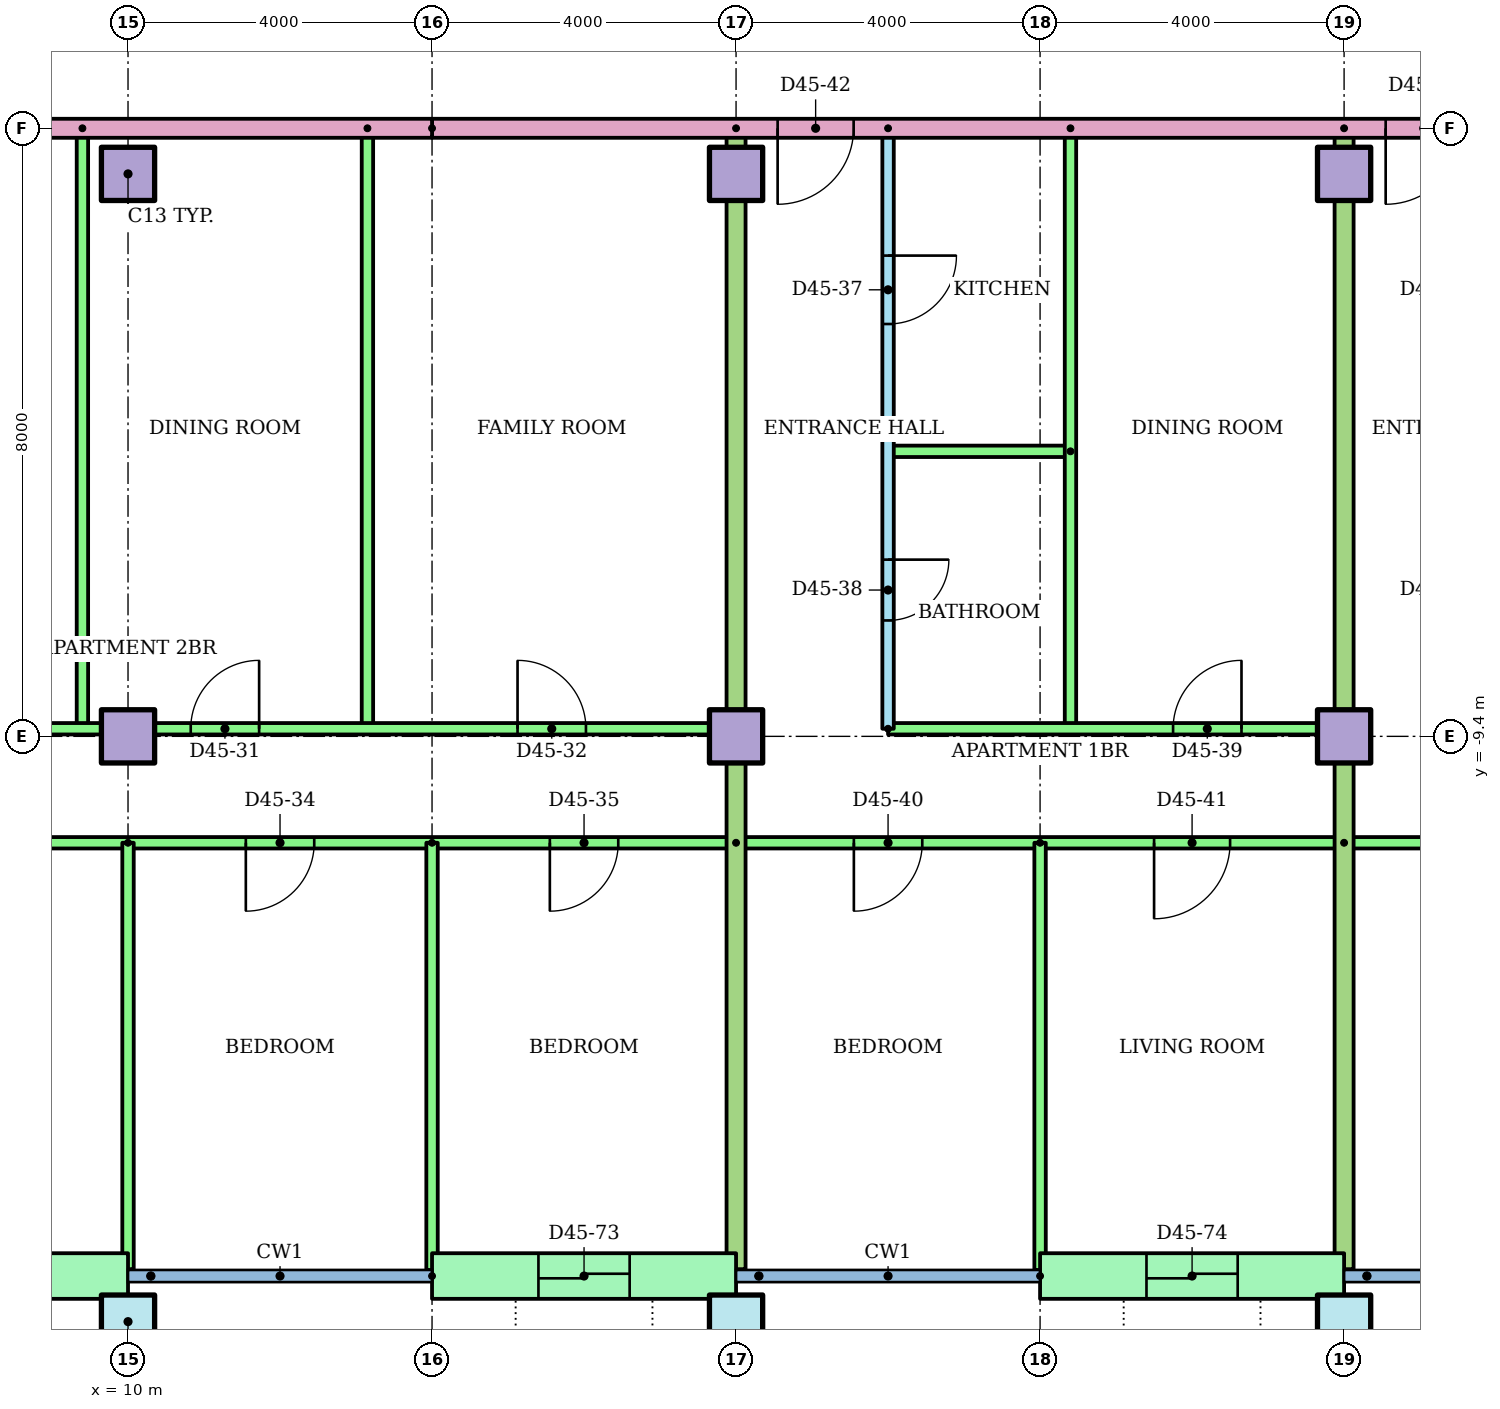
"""IFC4 building model, lengths in metres.
Left out: names, types, materials, properties, quantities, classifications, styles, units other than length and angle.
Written with IfcOpenShell. Run it as: python <this file> out.ifc"""

import sys

from ifc_helpers import new_model, si_unit, direction, frame, frame_2d, origin, origin_2d, place, context, subcontext, project, spatial, rectangle, hollow_rectangle, extrude, element, fill, save


model = new_model("IFC4")
c1 = context("Model", 3, precision=1e-05, world=origin(), true_north=direction((0.0, 1.0)))
c2 = subcontext(c1, "Body", "Model", "MODEL_VIEW")
j1 = project(units=[si_unit("LENGTHUNIT", "METRE"), si_unit("PLANEANGLEUNIT", "RADIAN")], contexts=[c1])
p1 = place(None, origin())
s1 = spatial("IfcSite", under=j1, at=p1, CompositionType="ELEMENT")
p2 = place(p1, origin())
s2 = spatial("IfcBuilding", under=s1, at=p2, CompositionType="ELEMENT")
p3 = place(p2, frame((0.0, 0.0, 174.9)))
s3 = spatial("IfcBuildingStorey", under=s2, at=p3, CompositionType="ELEMENT", Elevation=174.9)
for number, where in (
    (1, (10.0, -17.1, 0.0)),
    (2, (18.0, -17.1, 0.0)),
    (3, (26.0, -17.1, 0.0)),
):
    element("IfcColumn", number, at=place(p3, frame(where)), inside=s3, PredefinedType="COLUMN", context=c2, shape_type="SweptSolid", body=[
        extrude(hollow_rectangle(XDim=0.7, YDim=0.7, WallThickness=0.036, at=origin_2d()), origin(), (0.0, 0.0, 1.0), 3.2),
    ])
for number, where in (
    (4, (10.0, -9.4, 0.0)),
    (5, (18.0, -9.4, 0.0)),
    (6, (26.0, -9.4, 0.0)),
    (7, (10.0, -2.0, 0.0)),
    (8, (18.0, -2.0, 0.0)),
    (9, (26.0, -2.0, 0.0)),
):
    element("IfcColumn", number, at=place(p3, frame(where)), inside=s3, PredefinedType="COLUMN", context=c2, shape_type="SweptSolid", body=[
        extrude(rectangle(XDim=0.7, YDim=0.7, at=origin_2d()), origin(), (0.0, 0.0, 1.0), 3.2),
    ])
p4 = place(p3, frame((6.0, -16.5, 0.0)))
e10 = element("IfcWall", 10, at=p4, inside=s3, PredefinedType="STANDARD", context=c2, shape_type="SweptSolid", body=[
    extrude(rectangle(XDim=4.0, YDim=0.6, at=frame_2d((2.0, 0.0))), origin(), (0.0, 0.0, 1.0), 2.92),
])
p5 = place(p4, frame((1.4, 0.0, 0.0)))
e11 = element("IfcOpeningElement", 11, at=p5, cuts=e10, PredefinedType="OPENING", context=c2, shape_type="SweptSolid", body=[
    extrude(rectangle(XDim=1.2, YDim=2.1, at=frame_2d((0.6, 1.05))), frame((0.0, 0.31, 0.0), z_axis=(0.0, -1.0, 0.0), x_axis=(1.0, 0.0, 0.0)), (0.0, 0.0, 1.0), 0.62),
])
p6 = place(p3, frame((14.0, -16.5, 0.0)))
e12 = element("IfcWall", 12, at=p6, inside=s3, PredefinedType="STANDARD", context=c2, shape_type="SweptSolid", body=[
    extrude(rectangle(XDim=4.0, YDim=0.6, at=frame_2d((2.0, 0.0))), origin(), (0.0, 0.0, 1.0), 2.92),
])
p7 = place(p6, frame((1.4, 0.0, 0.0)))
e13 = element("IfcOpeningElement", 13, at=p7, cuts=e12, PredefinedType="OPENING", context=c2, shape_type="SweptSolid", body=[
    extrude(rectangle(XDim=1.2, YDim=2.1, at=frame_2d((0.6, 1.05))), frame((0.0, 0.31, 0.0), z_axis=(0.0, -1.0, 0.0), x_axis=(1.0, 0.0, 0.0)), (0.0, 0.0, 1.0), 0.62),
])
p8 = place(p3, frame((22.0, -16.5, 0.0)))
e14 = element("IfcWall", 14, at=p8, inside=s3, PredefinedType="STANDARD", context=c2, shape_type="SweptSolid", body=[
    extrude(rectangle(XDim=4.0, YDim=0.6, at=frame_2d((2.0, 0.0))), origin(), (0.0, 0.0, 1.0), 2.92),
])
p9 = place(p8, frame((1.4, 0.0, 0.0)))
e15 = element("IfcOpeningElement", 15, at=p9, cuts=e14, PredefinedType="OPENING", context=c2, shape_type="SweptSolid", body=[
    extrude(rectangle(XDim=1.2, YDim=2.1, at=frame_2d((0.6, 1.05))), frame((0.0, 0.31, 0.0), z_axis=(0.0, -1.0, 0.0), x_axis=(1.0, 0.0, 0.0)), (0.0, 0.0, 1.0), 0.62),
])
for number, where, z_axis, x_axis in (
    (16, (9.4, -1.4, 0.0), (0.0, 0.0, 1.0), (0.0, -1.0, 0.0)),
    (17, (13.15, -1.4, 0.0), (0.0, 0.0, 1.0), (0.0, -1.0, 0.0)),
):
    element("IfcWall", number, at=place(p3, frame(where, z_axis=z_axis, x_axis=x_axis)), inside=s3, PredefinedType="PARTITIONING", context=c2, shape_type="SweptSolid", body=[
        extrude(rectangle(XDim=7.9, YDim=0.15, at=frame_2d((3.95, 0.0))), origin(), (0.0, 0.0, 1.0), 2.4),
    ])
p10 = place(p3, frame((4.0, -9.3, 0.0)))
e18 = element("IfcWall", 18, at=p10, inside=s3, PredefinedType="PARTITIONING", context=c2, shape_type="SweptSolid", body=[
    extrude(rectangle(XDim=14.0, YDim=0.15, at=frame_2d((7.0, 0.0))), origin(), (0.0, 0.0, 1.0), 2.4),
])
p11 = place(p10, frame((3.45, 0.0, 0.0)))
e19 = element("IfcOpeningElement", 19, at=p11, cuts=e18, PredefinedType="OPENING", context=c2, shape_type="SweptSolid", body=[
    extrude(rectangle(XDim=0.9, YDim=2.1, at=frame_2d((0.45, 1.05))), frame((0.0, 0.085, 0.0), z_axis=(0.0, -1.0, 0.0), x_axis=(1.0, 0.0, 0.0)), (0.0, 0.0, 1.0), 0.17),
])
p12 = place(p10, frame((6.825, 0.0, 0.0)))
e20 = element("IfcOpeningElement", 20, at=p12, cuts=e18, PredefinedType="OPENING", context=c2, shape_type="SweptSolid", body=[
    extrude(rectangle(XDim=0.9, YDim=2.1, at=frame_2d((0.45, 1.05))), frame((0.0, 0.085, 0.0), z_axis=(0.0, -1.0, 0.0), x_axis=(1.0, 0.0, 0.0)), (0.0, 0.0, 1.0), 0.17),
])
p13 = place(p10, frame((11.125, 0.0, 0.0)))
e21 = element("IfcOpeningElement", 21, at=p13, cuts=e18, PredefinedType="OPENING", context=c2, shape_type="SweptSolid", body=[
    extrude(rectangle(XDim=0.9, YDim=2.1, at=frame_2d((0.45, 1.05))), frame((0.0, 0.085, 0.0), z_axis=(0.0, -1.0, 0.0), x_axis=(1.0, 0.0, 0.0)), (0.0, 0.0, 1.0), 0.17),
])
p14 = place(p3, frame((18.0, -10.8, 0.0), z_axis=(0.0, 0.0, 1.0), x_axis=(-1.0, 0.0, 0.0)))
e22 = element("IfcWall", 22, at=p14, inside=s3, PredefinedType="PARTITIONING", context=c2, shape_type="SweptSolid", body=[
    extrude(rectangle(XDim=16.0, YDim=0.15, at=frame_2d((8.0, 0.0))), origin(), (0.0, 0.0, 1.0), 2.4),
])
p15 = place(p14, frame((11.5, 0.0, 0.0)))
e23 = element("IfcOpeningElement", 23, at=p15, cuts=e22, PredefinedType="OPENING", context=c2, shape_type="SweptSolid", body=[
    extrude(rectangle(XDim=1.0, YDim=2.1, at=frame_2d((0.5, 1.05))), frame((0.0, 0.085, 0.0), z_axis=(0.0, -1.0, 0.0), x_axis=(1.0, 0.0, 0.0)), (0.0, 0.0, 1.0), 0.17),
])
p16 = place(p14, frame((5.55, 0.0, 0.0)))
e24 = element("IfcOpeningElement", 24, at=p16, cuts=e22, PredefinedType="OPENING", context=c2, shape_type="SweptSolid", body=[
    extrude(rectangle(XDim=0.9, YDim=2.1, at=frame_2d((0.45, 1.05))), frame((0.0, 0.085, 0.0), z_axis=(0.0, -1.0, 0.0), x_axis=(1.0, 0.0, 0.0)), (0.0, 0.0, 1.0), 0.17),
])
p17 = place(p14, frame((1.55, 0.0, 0.0)))
e25 = element("IfcOpeningElement", 25, at=p17, cuts=e22, PredefinedType="OPENING", context=c2, shape_type="SweptSolid", body=[
    extrude(rectangle(XDim=0.9, YDim=2.1, at=frame_2d((0.45, 1.05))), frame((0.0, 0.085, 0.0), z_axis=(0.0, -1.0, 0.0), x_axis=(1.0, 0.0, 0.0)), (0.0, 0.0, 1.0), 0.17),
])
p18 = place(p3, frame((10.0, -10.8, 0.0), z_axis=(0.0, 0.0, 1.0), x_axis=(0.0, -1.0, 0.0)))
e26 = element("IfcWall", 26, at=p18, inside=s3, PredefinedType="PARTITIONING", context=c2, shape_type="SweptSolid", body=[
    extrude(rectangle(XDim=5.61, YDim=0.15, at=frame_2d((2.805, 0.0))), origin(), (0.0, 0.0, 1.0), 2.4),
])
p19 = place(p3, frame((14.0, -10.8, 0.0), z_axis=(0.0, 0.0, 1.0), x_axis=(0.0, -1.0, 0.0)))
e27 = element("IfcWall", 27, at=p19, inside=s3, PredefinedType="PARTITIONING", context=c2, shape_type="SweptSolid", body=[
    extrude(rectangle(XDim=5.621, YDim=0.15, at=frame_2d((2.811, 0.0))), origin(), (0.0, 0.0, 1.0), 2.4),
])
p20 = place(p3, frame((20.0, -1.4, 0.0), z_axis=(0.0, 0.0, 1.0), x_axis=(0.0, -1.0, 0.0)))
e28 = element("IfcWall", 28, at=p20, inside=s3, PredefinedType="PARTITIONING", context=c2, shape_type="SweptSolid", body=[
    extrude(rectangle(XDim=7.9, YDim=0.15, at=frame_2d((3.95, 0.0))), origin(), (0.0, 0.0, 1.0), 2.4),
])
p21 = place(p20, frame((1.675, 0.0, 0.0)))
e29 = element("IfcOpeningElement", 29, at=p21, cuts=e28, PredefinedType="OPENING", context=c2, shape_type="SweptSolid", body=[
    extrude(rectangle(XDim=0.9, YDim=2.1, at=frame_2d((0.45, 1.05))), frame((0.0, 0.085, 0.0), z_axis=(0.0, -1.0, 0.0), x_axis=(1.0, 0.0, 0.0)), (0.0, 0.0, 1.0), 0.17),
])
p22 = place(p20, frame((5.675, 0.0, 0.0)))
e30 = element("IfcOpeningElement", 30, at=p22, cuts=e28, PredefinedType="OPENING", context=c2, shape_type="SweptSolid", body=[
    extrude(rectangle(XDim=0.8, YDim=2.1, at=frame_2d((0.4, 1.05))), frame((0.0, 0.085, 0.0), z_axis=(0.0, -1.0, 0.0), x_axis=(1.0, 0.0, 0.0)), (0.0, 0.0, 1.0), 0.17),
])
p23 = place(p3, frame((22.4, -5.65, 0.0), z_axis=(0.0, 0.0, 1.0), x_axis=(-1.0, 0.0, 0.0)))
e31 = element("IfcWall", 31, at=p23, inside=s3, PredefinedType="PARTITIONING", context=c2, shape_type="SweptSolid", body=[
    extrude(rectangle(XDim=2.4, YDim=0.15, at=frame_2d((1.2, 0.0))), origin(), (0.0, 0.0, 1.0), 2.4),
])
p24 = place(p3, frame((22.4, -1.4, 0.0), z_axis=(0.0, 0.0, 1.0), x_axis=(0.0, -1.0, 0.0)))
e32 = element("IfcWall", 32, at=p24, inside=s3, PredefinedType="PARTITIONING", context=c2, shape_type="SweptSolid", body=[
    extrude(rectangle(XDim=7.9, YDim=0.15, at=frame_2d((3.95, 0.0))), origin(), (0.0, 0.0, 1.0), 2.4),
])
p25 = place(p3, frame((20.0, -9.3, 0.0)))
e33 = element("IfcWall", 33, at=p25, inside=s3, PredefinedType="PARTITIONING", context=c2, shape_type="SweptSolid", body=[
    extrude(rectangle(XDim=6.0, YDim=0.15, at=frame_2d((3.0, 0.0))), origin(), (0.0, 0.0, 1.0), 2.4),
])
p26 = place(p25, frame((3.75, 0.0, 0.0)))
e34 = element("IfcOpeningElement", 34, at=p26, cuts=e33, PredefinedType="OPENING", context=c2, shape_type="SweptSolid", body=[
    extrude(rectangle(XDim=0.9, YDim=2.1, at=frame_2d((0.45, 1.05))), frame((0.0, 0.085, 0.0), z_axis=(0.0, -1.0, 0.0), x_axis=(1.0, 0.0, 0.0)), (0.0, 0.0, 1.0), 0.17),
])
p27 = place(p3, frame((26.0, -10.8, 0.0), z_axis=(0.0, 0.0, 1.0), x_axis=(-1.0, 0.0, 0.0)))
e35 = element("IfcWall", 35, at=p27, inside=s3, PredefinedType="PARTITIONING", context=c2, shape_type="SweptSolid", body=[
    extrude(rectangle(XDim=8.0, YDim=0.15, at=frame_2d((4.0, 0.0))), origin(), (0.0, 0.0, 1.0), 2.4),
])
p28 = place(p27, frame((5.55, 0.0, 0.0)))
e36 = element("IfcOpeningElement", 36, at=p28, cuts=e35, PredefinedType="OPENING", context=c2, shape_type="SweptSolid", body=[
    extrude(rectangle(XDim=0.9, YDim=2.1, at=frame_2d((0.45, 1.05))), frame((0.0, 0.085, 0.0), z_axis=(0.0, -1.0, 0.0), x_axis=(1.0, 0.0, 0.0)), (0.0, 0.0, 1.0), 0.17),
])
p29 = place(p27, frame((1.5, 0.0, 0.0)))
e37 = element("IfcOpeningElement", 37, at=p29, cuts=e35, PredefinedType="OPENING", context=c2, shape_type="SweptSolid", body=[
    extrude(rectangle(XDim=1.0, YDim=2.1, at=frame_2d((0.5, 1.05))), frame((0.0, 0.085, 0.0), z_axis=(0.0, -1.0, 0.0), x_axis=(1.0, 0.0, 0.0)), (0.0, 0.0, 1.0), 0.17),
])
p30 = place(p3, frame((22.0, -10.8, 0.0), z_axis=(0.0, 0.0, 1.0), x_axis=(0.0, -1.0, 0.0)))
e38 = element("IfcWall", 38, at=p30, inside=s3, PredefinedType="PARTITIONING", context=c2, shape_type="SweptSolid", body=[
    extrude(rectangle(XDim=5.621, YDim=0.15, at=frame_2d((2.811, 0.0))), origin(), (0.0, 0.0, 1.0), 2.4),
])
p31 = place(p3, frame((18.0, -1.4, 0.0), z_axis=(0.0, 0.0, 1.0), x_axis=(0.0, -1.0, 0.0)))
e39 = element("IfcWall", 39, at=p31, inside=s3, PredefinedType="PARTITIONING", context=c2, shape_type="SweptSolid", body=[
    extrude(rectangle(XDim=15.01, YDim=0.25, at=frame_2d((7.505, 0.0))), origin(), (0.0, 0.0, 1.0), 2.4),
])
p32 = place(p3, frame((36.82, -10.8, 0.0), z_axis=(0.0, 0.0, 1.0), x_axis=(-1.0, 0.0, 0.0)))
e40 = element("IfcWall", 40, at=p32, inside=s3, PredefinedType="PARTITIONING", context=c2, shape_type="SweptSolid", body=[
    extrude(rectangle(XDim=10.82, YDim=0.15, at=frame_2d((5.41, 0.0))), origin(), (0.0, 0.0, 1.0), 2.4),
])
p33 = place(p32, frame((7.27, 0.0, 0.0)))
e41 = element("IfcOpeningElement", 41, at=p33, cuts=e40, PredefinedType="OPENING", context=c2, shape_type="SweptSolid", body=[
    extrude(rectangle(XDim=1.0, YDim=2.1, at=frame_2d((0.5, 1.05))), frame((0.0, 0.085, 0.0), z_axis=(0.0, -1.0, 0.0), x_axis=(1.0, 0.0, 0.0)), (0.0, 0.0, 1.0), 0.17),
])
p34 = place(p32, frame((1.373, 0.0, 0.0)))
e42 = element("IfcOpeningElement", 42, at=p34, cuts=e40, PredefinedType="OPENING", context=c2, shape_type="SweptSolid", body=[
    extrude(rectangle(XDim=0.9, YDim=2.1, at=frame_2d((0.45, 1.05))), frame((0.0, 0.085, 0.0), z_axis=(0.0, -1.0, 0.0), x_axis=(1.0, 0.0, 0.0)), (0.0, 0.0, 1.0), 0.17),
])
p35 = place(p3, frame((26.0, -1.4, 0.0), z_axis=(0.0, 0.0, 1.0), x_axis=(0.0, -1.0, 0.0)))
e43 = element("IfcWall", 43, at=p35, inside=s3, PredefinedType="PARTITIONING", context=c2, shape_type="SweptSolid", body=[
    extrude(rectangle(XDim=15.01, YDim=0.25, at=frame_2d((7.505, 0.0))), origin(), (0.0, 0.0, 1.0), 2.4),
])
p36 = place(p3, frame((29.0, -1.4, 0.0), z_axis=(0.0, 0.0, 1.0), x_axis=(-1.0, 0.0, 0.0)))
e44 = element("IfcWall", 44, at=p36, inside=s3, PredefinedType="PARTITIONING", context=c2, shape_type="SweptSolid", body=[
    extrude(rectangle(XDim=15.0, YDim=0.25, at=frame_2d((7.5, 0.0))), origin(), (0.0, 0.0, 1.0), 2.4),
])
p37 = place(p36, frame((9.453, 0.0, 0.0)))
e45 = element("IfcOpeningElement", 45, at=p37, cuts=e44, PredefinedType="OPENING", context=c2, shape_type="SweptSolid", body=[
    extrude(rectangle(XDim=1.0, YDim=2.1, at=frame_2d((0.5, 1.05))), frame((0.0, 0.135, 0.0), z_axis=(0.0, -1.0, 0.0), x_axis=(1.0, 0.0, 0.0)), (0.0, 0.0, 1.0), 0.27),
])
p38 = place(p36, frame((1.453, 0.0, 0.0)))
e46 = element("IfcOpeningElement", 46, at=p38, cuts=e44, PredefinedType="OPENING", context=c2, shape_type="SweptSolid", body=[
    extrude(rectangle(XDim=1.0, YDim=2.1, at=frame_2d((0.5, 1.05))), frame((0.0, 0.135, 0.0), z_axis=(0.0, -1.0, 0.0), x_axis=(1.0, 0.0, 0.0)), (0.0, 0.0, 1.0), 0.27),
])
p39 = place(p3, frame((14.0, -1.4, 0.0), z_axis=(0.0, 0.0, 1.0), x_axis=(-1.0, 0.0, 0.0)))
e47 = element("IfcWall", 47, at=p39, inside=s3, PredefinedType="PARTITIONING", context=c2, shape_type="SweptSolid", body=[
    extrude(rectangle(XDim=28.0, YDim=0.25, at=frame_2d((14.0, 0.0))), origin(), (0.0, 0.0, 1.0), 2.4),
])
p40 = place(p39, frame((12.547, 0.0, 0.0)))
e48 = element("IfcOpeningElement", 48, at=p40, cuts=e47, PredefinedType="OPENING", context=c2, shape_type="SweptSolid", body=[
    extrude(rectangle(XDim=1.0, YDim=2.1, at=frame_2d((0.5, 1.05))), frame((0.0, 0.135, 0.0), z_axis=(0.0, -1.0, 0.0), x_axis=(1.0, 0.0, 0.0)), (0.0, 0.0, 1.0), 0.27),
])
p41 = place(p39, frame((10.453, 0.0, 0.0)))
e49 = element("IfcOpeningElement", 49, at=p41, cuts=e47, PredefinedType="OPENING", context=c2, shape_type="SweptSolid", body=[
    extrude(rectangle(XDim=1.0, YDim=2.1, at=frame_2d((0.5, 1.05))), frame((0.0, 0.135, 0.0), z_axis=(0.0, -1.0, 0.0), x_axis=(1.0, 0.0, 0.0)), (0.0, 0.0, 1.0), 0.27),
])
p42 = place(p12, origin())
e50 = element("IfcDoor", 50, at=p42, inside=s3, OperationType="SINGLE_SWING_RIGHT", PredefinedType="DOOR", context=c2, shape_type="SweptSolid", body=[
    extrude(rectangle(XDim=0.9, YDim=2.1, at=frame_2d((0.45, 1.05))), frame((0.0, 0.025, 0.0), z_axis=(0.0, -1.0, 0.0), x_axis=(1.0, 0.0, 0.0)), (0.0, 0.0, 1.0), 0.05),
])
fill(e20, e50)
p43 = place(p13, origin())
e51 = element("IfcDoor", 51, at=p43, inside=s3, OperationType="SINGLE_SWING_LEFT", PredefinedType="DOOR", context=c2, shape_type="SweptSolid", body=[
    extrude(rectangle(XDim=0.9, YDim=2.1, at=frame_2d((0.45, 1.05))), frame((0.0, 0.025, 0.0), z_axis=(0.0, -1.0, 0.0), x_axis=(1.0, 0.0, 0.0)), (0.0, 0.0, 1.0), 0.05),
])
fill(e21, e51)
p44 = place(p16, origin())
e52 = element("IfcDoor", 52, at=p44, inside=s3, OperationType="SINGLE_SWING_RIGHT", PredefinedType="DOOR", context=c2, shape_type="SweptSolid", body=[
    extrude(rectangle(XDim=0.9, YDim=2.1, at=frame_2d((0.45, 1.05))), frame((0.0, 0.025, 0.0), z_axis=(0.0, -1.0, 0.0), x_axis=(1.0, 0.0, 0.0)), (0.0, 0.0, 1.0), 0.05),
])
fill(e24, e52)
p45 = place(p17, origin())
e53 = element("IfcDoor", 53, at=p45, inside=s3, OperationType="SINGLE_SWING_RIGHT", PredefinedType="DOOR", context=c2, shape_type="SweptSolid", body=[
    extrude(rectangle(XDim=0.9, YDim=2.1, at=frame_2d((0.45, 1.05))), frame((0.0, 0.025, 0.0), z_axis=(0.0, -1.0, 0.0), x_axis=(1.0, 0.0, 0.0)), (0.0, 0.0, 1.0), 0.05),
])
fill(e25, e53)
p46 = place(p21, origin())
e54 = element("IfcDoor", 54, at=p46, inside=s3, OperationType="SINGLE_SWING_LEFT", PredefinedType="DOOR", context=c2, shape_type="SweptSolid", body=[
    extrude(rectangle(XDim=0.9, YDim=2.1, at=frame_2d((0.45, 1.05))), frame((0.0, 0.025, 0.0), z_axis=(0.0, -1.0, 0.0), x_axis=(1.0, 0.0, 0.0)), (0.0, 0.0, 1.0), 0.05),
])
fill(e29, e54)
p47 = place(p22, origin())
e55 = element("IfcDoor", 55, at=p47, inside=s3, OperationType="SINGLE_SWING_LEFT", PredefinedType="DOOR", context=c2, shape_type="SweptSolid", body=[
    extrude(rectangle(XDim=0.8, YDim=2.1, at=frame_2d((0.4, 1.05))), frame((0.0, 0.025, 0.0), z_axis=(0.0, -1.0, 0.0), x_axis=(1.0, 0.0, 0.0)), (0.0, 0.0, 1.0), 0.05),
])
fill(e30, e55)
p48 = place(p26, origin())
e56 = element("IfcDoor", 56, at=p48, inside=s3, OperationType="SINGLE_SWING_RIGHT", PredefinedType="DOOR", context=c2, shape_type="SweptSolid", body=[
    extrude(rectangle(XDim=0.9, YDim=2.1, at=frame_2d((0.45, 1.05))), frame((0.0, 0.025, 0.0), z_axis=(0.0, -1.0, 0.0), x_axis=(1.0, 0.0, 0.0)), (0.0, 0.0, 1.0), 0.05),
])
fill(e34, e56)
p49 = place(p28, origin())
e57 = element("IfcDoor", 57, at=p49, inside=s3, OperationType="SINGLE_SWING_RIGHT", PredefinedType="DOOR", context=c2, shape_type="SweptSolid", body=[
    extrude(rectangle(XDim=0.9, YDim=2.1, at=frame_2d((0.45, 1.05))), frame((0.0, 0.025, 0.0), z_axis=(0.0, -1.0, 0.0), x_axis=(1.0, 0.0, 0.0)), (0.0, 0.0, 1.0), 0.05),
])
fill(e36, e57)
p50 = place(p29, origin())
e58 = element("IfcDoor", 58, at=p50, inside=s3, OperationType="SINGLE_SWING_RIGHT", PredefinedType="DOOR", context=c2, shape_type="SweptSolid", body=[
    extrude(rectangle(XDim=1.0, YDim=2.1, at=frame_2d((0.5, 1.05))), frame((0.0, 0.025, 0.0), z_axis=(0.0, -1.0, 0.0), x_axis=(1.0, 0.0, 0.0)), (0.0, 0.0, 1.0), 0.05),
])
fill(e37, e58)
p51 = place(p37, origin())
e59 = element("IfcDoor", 59, at=p51, inside=s3, OperationType="SINGLE_SWING_RIGHT", PredefinedType="DOOR", context=c2, shape_type="SweptSolid", body=[
    extrude(rectangle(XDim=1.0, YDim=2.1, at=frame_2d((0.5, 1.05))), frame((0.0, 0.025, 0.0), z_axis=(0.0, -1.0, 0.0), x_axis=(1.0, 0.0, 0.0)), (0.0, 0.0, 1.0), 0.05),
])
fill(e45, e59)
p52 = place(p38, origin())
e60 = element("IfcDoor", 60, at=p52, inside=s3, OperationType="SINGLE_SWING_RIGHT", PredefinedType="DOOR", context=c2, shape_type="SweptSolid", body=[
    extrude(rectangle(XDim=1.0, YDim=2.1, at=frame_2d((0.5, 1.05))), frame((0.0, 0.025, 0.0), z_axis=(0.0, -1.0, 0.0), x_axis=(1.0, 0.0, 0.0)), (0.0, 0.0, 1.0), 0.05),
])
fill(e46, e60)
p53 = place(p7, origin())
e61 = element("IfcDoor", 61, at=p53, inside=s3, OperationType="SLIDING_TO_LEFT", PredefinedType="DOOR", context=c2, shape_type="SweptSolid", body=[
    extrude(rectangle(XDim=1.2, YDim=2.1, at=frame_2d((0.6, 1.05))), frame((0.0, 0.025, 0.0), z_axis=(0.0, -1.0, 0.0), x_axis=(1.0, 0.0, 0.0)), (0.0, 0.0, 1.0), 0.05),
])
fill(e13, e61)
p54 = place(p9, origin())
e62 = element("IfcDoor", 62, at=p54, inside=s3, OperationType="SLIDING_TO_LEFT", PredefinedType="DOOR", context=c2, shape_type="SweptSolid", body=[
    extrude(rectangle(XDim=1.2, YDim=2.1, at=frame_2d((0.6, 1.05))), frame((0.0, 0.025, 0.0), z_axis=(0.0, -1.0, 0.0), x_axis=(1.0, 0.0, 0.0)), (0.0, 0.0, 1.0), 0.05),
])
fill(e15, e62)
save(model, sys.argv[1])
